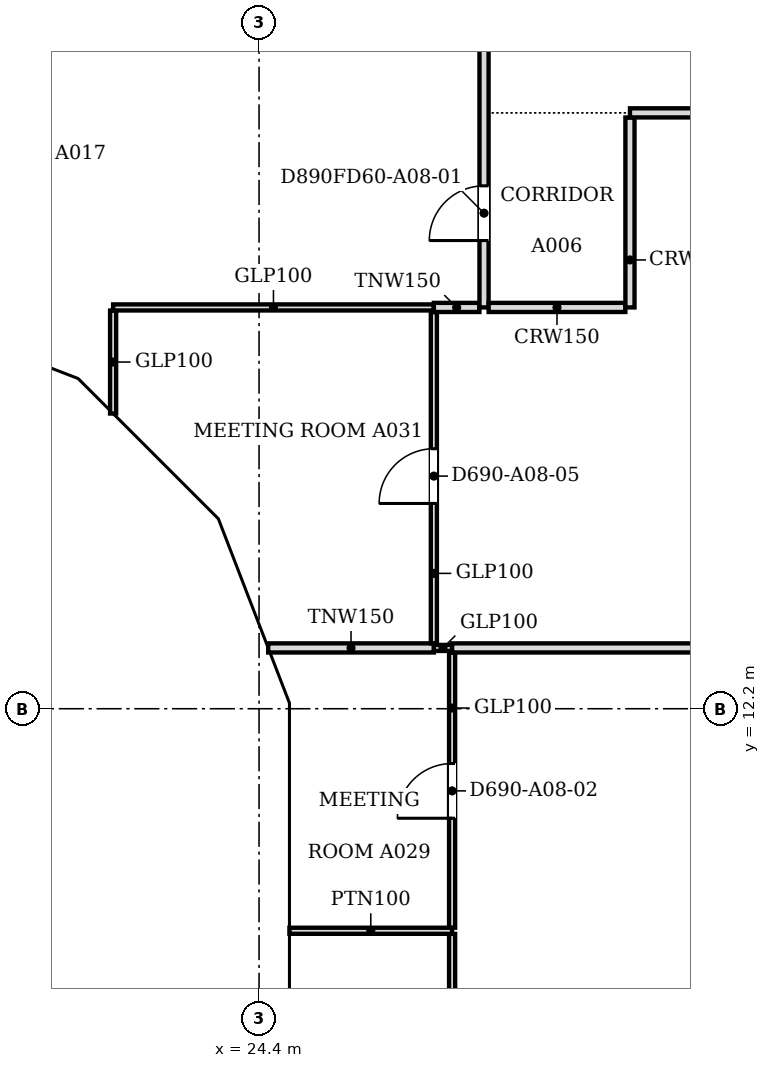
"""IFC4 building model, lengths in metres.
Left out: names, types, materials, properties, quantities, classifications, styles, units other than length and angle.
Written with IfcOpenShell. Run it as: python <this file> out.ifc"""

import sys

from ifc_helpers import new_model, si_unit, direction, frame, frame_2d, origin, place, context, subcontext, project, spatial, polyline, rectangle, outline, extrude, faceted_brep, source, transform, mapped, element, fill, save


model = new_model("IFC4")
c1 = context("Model", 3, precision=1e-05, world=origin(), true_north=direction((0.0, 1.0)))
c2 = subcontext(c1, "Body", "Model", "MODEL_VIEW")
j1 = project(units=[si_unit("LENGTHUNIT", "METRE"), si_unit("PLANEANGLEUNIT", "RADIAN")], contexts=[c1])
p1 = place(None, origin())
s1 = spatial("IfcSite", under=j1, at=p1, CompositionType="ELEMENT")
p2 = place(p1, origin())
s2 = spatial("IfcBuilding", under=s1, at=p2, CompositionType="ELEMENT")
p3 = place(p2, frame((0.0, 0.0, 91.4)))
s3 = spatial("IfcBuildingStorey", under=s2, at=p3, CompositionType="ELEMENT", Elevation=91.4)
m1 = source(origin(), c2, "Body", "Brep", [
    faceted_brep([(0.093, -0.25, 0.056), (3.143, -0.25, 3.736), (3.143, -0.25, 3.864), (0.093, -0.25, 7.544), (0.0, 0.25, 7.543), (0.047, 0.25, 7.6), (3.196, 0.25, 3.8), (0.047, 0.25, 0.0), (0.0, 0.25, 0.057), (3.196, -0.0, 3.8), (0.047, 0.0, 0.0), (0.047, 0.0, 7.6)], [[[0, 1, 2, 3]], [[4, 5, 6, 7, 8]], [[7, 6, 9, 1, 0, 10]], [[6, 5, 11, 3, 2, 9]], [[5, 4, 11]], [[8, 7, 10]], [[8, 10, 0, 3, 11, 4]], [[1, 9, 2]]]),
])
p4 = place(p3, frame((18.303, 18.567, -3.8), z_axis=(0.0, 0.0, 1.0), x_axis=(0.932978940178, -0.359930961693, 0.0)))
e1 = element("IfcWall", 1, at=p4, inside=s3, PredefinedType="SOLIDWALL", context=c2, shape_type="MappedRepresentation", body=[
    mapped(m1, transform((0.0, 0.0, 0.0), scale=1.0)),
])
m2 = source(origin(), c2, "Body", "SweptSolid", [
    extrude(outline(polyline([(0.247, 0.633), (2.871, 3.8), (0.247, 6.967), (0.247, 0.633)])), frame((0.0, 0.26, 0.0), z_axis=(0.0, -1.0, 0.0), x_axis=(1.0, 0.0, 0.0)), (0.0, 0.0, 1.0), 0.52),
])
p5 = place(p4, origin())
e2 = element("IfcOpeningElement", 2, at=p5, cuts=e1, PredefinedType="OPENING", context=c2, shape_type="MappedRepresentation", body=[
    mapped(m2, transform((0.0, 0.0, 0.0), scale=1.0)),
])
m3 = source(origin(), c2, "Body", "Brep", [
    faceted_brep([(3.103, -0.25, 7.536), (0.053, -0.25, 3.864), (0.053, -0.25, 3.736), (3.103, -0.25, 0.064), (0.0, 0.25, 3.8), (3.156, 0.25, 7.6), (3.209, 0.25, 7.536), (3.209, 0.25, 0.064), (3.156, 0.25, 0.0), (3.156, -0.0, 0.0), (3.156, -0.0, 7.6), (0.0, 0.0, 3.8)], [[[0, 1, 2, 3]], [[4, 5, 6, 7, 8]], [[8, 7, 9]], [[6, 5, 10]], [[5, 4, 11, 1, 0, 10]], [[4, 8, 9, 3, 2, 11]], [[11, 2, 1]], [[3, 9, 7, 6, 10, 0]]]),
])
p6 = place(p3, frame((21.285, 17.417, -3.8), z_axis=(0.0, 0.0, 1.0), x_axis=(0.707106781187, -0.707106781187, 0.0)))
e3 = element("IfcWall", 3, at=p6, inside=s3, PredefinedType="SOLIDWALL", context=c2, shape_type="MappedRepresentation", body=[
    mapped(m3, transform((0.0, 0.0, 0.0), scale=1.0)),
])
m4 = source(origin(), c2, "Body", "SweptSolid", [
    extrude(outline(polyline([(2.956, 6.968), (0.325, 3.8), (2.956, 0.632), (2.956, 6.968)])), frame((0.0, 0.26, 0.0), z_axis=(0.0, -1.0, 0.0), x_axis=(1.0, 0.0, 0.0)), (0.0, 0.0, 1.0), 0.52),
])
p7 = place(p6, origin())
e4 = element("IfcOpeningElement", 4, at=p7, cuts=e3, PredefinedType="OPENING", context=c2, shape_type="MappedRepresentation", body=[
    mapped(m4, transform((0.0, 0.0, 0.0), scale=1.0)),
])
m5 = source(origin(), c2, "Body", "Brep", [
    faceted_brep([(0.106, -0.25, 0.064), (3.156, -0.25, 3.744), (3.156, -0.25, 3.856), (0.106, -0.25, 7.536), (0.0, 0.25, 7.536), (0.053, 0.25, 7.6), (3.202, 0.25, 3.8), (0.053, 0.25, 0.0), (0.0, 0.25, 0.064), (3.202, -0.0, 3.8), (0.053, 0.0, 0.0), (0.053, 0.0, 7.6)], [[[0, 1, 2, 3]], [[4, 5, 6, 7, 8]], [[7, 6, 9, 1, 0, 10]], [[6, 5, 11, 3, 2, 9]], [[5, 4, 11]], [[8, 7, 10]], [[8, 10, 0, 3, 11, 4]], [[1, 9, 2]]]),
])
p8 = place(p3, frame((23.497, 15.234, -3.8), z_axis=(0.0, 0.0, 1.0), x_axis=(0.359913782069, -0.932985567668, 0.0)))
e5 = element("IfcWall", 5, at=p8, inside=s3, PredefinedType="SOLIDWALL", context=c2, shape_type="MappedRepresentation", body=[
    mapped(m5, transform((0.0, 0.0, 0.0), scale=1.0)),
])
m6 = source(origin(), c2, "Body", "SweptSolid", [
    extrude(outline(polyline([(0.253, 0.633), (2.878, 3.8), (0.253, 6.967), (0.253, 0.633)])), frame((0.0, 0.26, 0.0), z_axis=(0.0, -1.0, 0.0), x_axis=(1.0, 0.0, 0.0)), (0.0, 0.0, 1.0), 0.52),
])
p9 = place(p8, origin())
e6 = element("IfcOpeningElement", 6, at=p9, cuts=e5, PredefinedType="OPENING", context=c2, shape_type="MappedRepresentation", body=[
    mapped(m6, transform((0.0, 0.0, 0.0), scale=1.0)),
])
m7 = source(origin(), c2, "Body", "Brep", [
    faceted_brep([(3.096, -0.25, 0.0), (6.1, -0.25, 3.8), (3.096, -0.25, 7.6), (0.047, -0.25, 3.857), (0.047, -0.25, 3.743), (0.0, 0.25, 3.8), (3.096, 0.25, 7.6), (6.053, 0.25, 3.859), (6.053, 0.25, 3.741), (3.096, 0.25, 0.0), (6.1, -0.0, 3.8), (0.0, 0.0, 3.8)], [[[0, 1, 2, 3, 4]], [[5, 6, 7, 8, 9]], [[9, 8, 10, 1, 0]], [[7, 6, 2, 1, 10]], [[6, 5, 11, 3, 2]], [[5, 9, 0, 4, 11]], [[11, 4, 3]], [[10, 8, 7]]]),
])
p10 = place(p3, frame((24.65, 12.247, -3.8), z_axis=(0.0, 0.0, 1.0), x_axis=(0.0, -1.0, 0.0)))
e7 = element("IfcWall", 7, at=p10, inside=s3, PredefinedType="SOLIDWALL", context=c2, shape_type="MappedRepresentation", body=[
    mapped(m7, transform((0.0, 0.0, 0.0), scale=1.0)),
])
m8 = source(origin(), c2, "Body", "SweptSolid", [
    extrude(outline(polyline([(3.094, 0.399), (5.781, 3.8), (3.094, 7.2), (0.323, 3.8), (3.094, 0.399)])), frame((0.0, 0.26, 0.0), z_axis=(0.0, -1.0, 0.0), x_axis=(1.0, 0.0, 0.0)), (0.0, 0.0, 1.0), 0.52),
])
p11 = place(p10, origin())
e8 = element("IfcOpeningElement", 8, at=p11, cuts=e7, PredefinedType="OPENING", context=c2, shape_type="MappedRepresentation", body=[
    mapped(m8, transform((0.0, 0.0, 0.0), scale=1.0)),
])
p12 = place(p2, frame((0.0, 0.0, 95.2)))
s4 = spatial("IfcBuildingStorey", under=s2, at=p12, CompositionType="ELEMENT", Elevation=95.2)
m9 = source(origin(), c2, "Body", "Brep", [
    faceted_brep([(3.096, -0.25, 7.536), (0.047, -0.25, 3.856), (0.047, -0.25, 3.744), (3.096, -0.25, 0.064), (0.0, 0.25, 3.8), (3.149, 0.25, 7.6), (3.202, 0.25, 7.536), (3.202, 0.25, 0.064), (3.149, 0.25, 0.0), (3.149, -0.0, 0.0), (3.149, -0.0, 7.6), (0.0, 0.0, 3.8)], [[[0, 1, 2, 3]], [[4, 5, 6, 7, 8]], [[8, 7, 9]], [[6, 5, 10]], [[5, 4, 11, 1, 0, 10]], [[4, 8, 9, 3, 2, 11]], [[11, 2, 1]], [[3, 9, 7, 6, 10, 0]]]),
])
p13 = place(p12, frame((18.346, 18.55, -3.8), z_axis=(0.0, 0.0, 1.0), x_axis=(0.932985567668, -0.359913782069, 0.0)))
e9 = element("IfcWall", 9, at=p13, inside=s4, PredefinedType="SOLIDWALL", context=c2, shape_type="MappedRepresentation", body=[
    mapped(m9, transform((0.0, 0.0, 0.0), scale=1.0)),
])
m10 = source(origin(), c2, "Body", "SweptSolid", [
    extrude(outline(polyline([(2.949, 6.967), (0.325, 3.8), (2.949, 0.633), (2.949, 6.967)])), frame((0.0, 0.26, 0.0), z_axis=(0.0, -1.0, 0.0), x_axis=(1.0, 0.0, 0.0)), (0.0, 0.0, 1.0), 0.52),
])
p14 = place(p13, origin())
e10 = element("IfcOpeningElement", 10, at=p14, cuts=e9, PredefinedType="OPENING", context=c2, shape_type="MappedRepresentation", body=[
    mapped(m10, transform((0.0, 0.0, 0.0), scale=1.0)),
])
m11 = source(origin(), c2, "Body", "Brep", [
    faceted_brep([(0.106, -0.25, 0.064), (3.156, -0.25, 3.736), (3.156, -0.25, 3.864), (0.106, -0.25, 7.536), (0.0, 0.25, 7.536), (0.053, 0.25, 7.6), (3.209, 0.25, 3.8), (0.053, 0.25, 0.0), (0.0, 0.25, 0.064), (3.209, -0.0, 3.8), (0.053, 0.0, 0.0), (0.053, 0.0, 7.6)], [[[0, 1, 2, 3]], [[4, 5, 6, 7, 8]], [[7, 6, 9, 1, 0, 10]], [[6, 5, 11, 3, 2, 9]], [[5, 4, 11]], [[8, 7, 10]], [[8, 10, 0, 3, 11, 4]], [[1, 9, 2]]]),
])
p15 = place(p12, frame((21.248, 17.454, -3.8), z_axis=(0.0, 0.0, 1.0), x_axis=(0.707106781187, -0.707106781187, 0.0)))
e11 = element("IfcWall", 11, at=p15, inside=s4, PredefinedType="SOLIDWALL", context=c2, shape_type="MappedRepresentation", body=[
    mapped(m11, transform((0.0, 0.0, 0.0), scale=1.0)),
])
m12 = source(origin(), c2, "Body", "SweptSolid", [
    extrude(outline(polyline([(0.253, 0.632), (2.884, 3.8), (0.253, 6.968), (0.253, 0.632)])), frame((0.0, 0.26, 0.0), z_axis=(0.0, -1.0, 0.0), x_axis=(1.0, 0.0, 0.0)), (0.0, 0.0, 1.0), 0.52),
])
p16 = place(p15, origin())
e12 = element("IfcOpeningElement", 12, at=p16, cuts=e11, PredefinedType="OPENING", context=c2, shape_type="MappedRepresentation", body=[
    mapped(m12, transform((0.0, 0.0, 0.0), scale=1.0)),
])
m13 = source(origin(), c2, "Body", "Brep", [
    faceted_brep([(3.103, -0.25, 7.544), (0.053, -0.25, 3.864), (0.053, -0.25, 3.736), (3.103, -0.25, 0.056), (0.0, 0.25, 3.8), (3.149, 0.25, 7.6), (3.196, 0.25, 7.543), (3.196, 0.25, 0.057), (3.149, 0.25, 0.0), (3.149, -0.0, 0.0), (3.149, -0.0, 7.6), (0.0, 0.0, 3.8)], [[[0, 1, 2, 3]], [[4, 5, 6, 7, 8]], [[8, 7, 9]], [[6, 5, 10]], [[5, 4, 11, 1, 0, 10]], [[4, 8, 9, 3, 2, 11]], [[11, 2, 1]], [[3, 9, 7, 6, 10, 0]]]),
])
p17 = place(p12, frame((23.517, 15.185, -3.8), z_axis=(0.0, 0.0, 1.0), x_axis=(0.359864468756, -0.933004589553, 0.0)))
e13 = element("IfcWall", 13, at=p17, inside=s4, PredefinedType="SOLIDWALL", context=c2, shape_type="MappedRepresentation", body=[
    mapped(m13, transform((0.0, 0.0, 0.0), scale=1.0)),
])
p18 = place(p17, origin())
e14 = element("IfcOpeningElement", 14, at=p18, cuts=e13, PredefinedType="OPENING", context=c2, shape_type="MappedRepresentation", body=[
    mapped(m10, transform((0.0, 0.0, 0.0), scale=1.0)),
])
m14 = source(origin(), c2, "Body", "Brep", [
    faceted_brep([(0.093, -0.25, 0.057), (3.143, -0.25, 3.8), (0.093, -0.25, 7.543), (0.0, 0.25, 7.544), (0.047, 0.25, 7.6), (3.143, 0.25, 3.8), (0.047, 0.25, 0.0), (0.0, 0.25, 0.056), (0.047, 0.0, 0.0), (0.047, 0.0, 7.6)], [[[0, 1, 2]], [[3, 4, 5, 6, 7]], [[6, 5, 1, 0, 8]], [[5, 4, 9, 2, 1]], [[4, 3, 9]], [[7, 6, 8]], [[7, 8, 0, 2, 9, 3]]]),
])
p19 = place(p12, frame((24.65, 12.293, -3.8), z_axis=(0.0, 0.0, 1.0), x_axis=(0.0, -1.0, 0.0)))
e15 = element("IfcWall", 15, at=p19, inside=s4, PredefinedType="SOLIDWALL", context=c2, shape_type="MappedRepresentation", body=[
    mapped(m14, transform((0.0, 0.0, 0.0), scale=1.0)),
])
m15 = source(origin(), c2, "Body", "SweptSolid", [
    extrude(outline(polyline([(0.247, 0.641), (2.821, 3.8), (0.247, 6.959), (0.247, 0.641)])), frame((0.0, 0.26, 0.0), z_axis=(0.0, -1.0, 0.0), x_axis=(1.0, 0.0, 0.0)), (0.0, 0.0, 1.0), 0.52),
])
p20 = place(p19, origin())
e16 = element("IfcOpeningElement", 16, at=p20, cuts=e15, PredefinedType="OPENING", context=c2, shape_type="MappedRepresentation", body=[
    mapped(m15, transform((0.0, 0.0, 0.0), scale=1.0)),
])
m16 = source(origin(), c2, "Body", "Brep", [
    faceted_brep([(3.003, -0.25, 0.0), (3.05, -0.25, 0.06), (3.05, -0.25, 7.54), (3.003, -0.25, 7.6), (0.0, -0.25, 3.8), (0.0, 0.25, 3.8), (2.957, 0.25, 7.541), (2.957, 0.25, 0.059), (3.003, 0.0, 0.0), (3.003, 0.0, 7.6)], [[[0, 1, 2, 3, 4]], [[5, 6, 7]], [[1, 0, 8]], [[9, 3, 2]], [[6, 5, 4, 3, 9]], [[5, 7, 8, 0, 4]], [[1, 8, 7, 6, 9, 2]]]),
])
p21 = place(p12, frame((24.65, 9.15, -3.8), z_axis=(0.0, 0.0, 1.0), x_axis=(0.0, -1.0, 0.0)))
e17 = element("IfcWall", 17, at=p21, inside=s4, PredefinedType="SOLIDWALL", context=c2, shape_type="MappedRepresentation", body=[
    mapped(m16, transform((0.0, 0.0, 0.0), scale=1.0)),
])
m17 = source(origin(), c2, "Body", "SweptSolid", [
    extrude(outline(polyline([(2.803, 6.944), (0.319, 3.8), (2.803, 0.656), (2.803, 6.944)])), frame((0.0, 0.26, 0.0), z_axis=(0.0, -1.0, 0.0), x_axis=(1.0, 0.0, 0.0)), (0.0, 0.0, 1.0), 0.52),
])
p22 = place(p21, origin())
e18 = element("IfcOpeningElement", 18, at=p22, cuts=e17, PredefinedType="OPENING", context=c2, shape_type="MappedRepresentation", body=[
    mapped(m17, transform((0.0, 0.0, 0.0), scale=1.0)),
])
p23 = place(p3, frame((27.575, 4.2, 0.0), z_axis=(0.0, 0.0, 1.0), x_axis=(0.0, 1.0, 0.0)))
e19 = element("IfcWall", 19, at=p23, inside=s3, PredefinedType="PARTITIONING", context=c2, shape_type="SweptSolid", body=[
    extrude(rectangle(XDim=4.297, YDim=0.1, at=frame_2d((2.148, 0.0))), origin(), (0.0, 0.0, 1.0), 2.895),
])
m18 = source(origin(), c2, "Body", "SweptSolid", [
    extrude(rectangle(XDim=0.9, YDim=2.1, at=frame_2d((0.45, 1.05))), frame((0.0, 0.06, 0.0), z_axis=(0.0, -1.0, 0.0), x_axis=(1.0, 0.0, 0.0)), (0.0, 0.0, 1.0), 0.12),
])
p24 = place(p23, frame((1.7, 0.0, 0.0)))
e20 = element("IfcOpeningElement", 20, at=p24, cuts=e19, PredefinedType="OPENING", context=c2, shape_type="MappedRepresentation", body=[
    mapped(m18, transform((0.0, 0.0, 0.0), scale=1.0)),
])
p25 = place(p3, frame((24.9, 8.548, 0.0), z_axis=(0.0, 0.0, 1.0), x_axis=(1.0, 0.0, 0.0)))
e21 = element("IfcWall", 21, at=p25, inside=s3, PredefinedType="PARTITIONING", context=c2, shape_type="SweptSolid", body=[
    extrude(rectangle(XDim=2.675, YDim=0.1, at=frame_2d((1.337, 0.0))), origin(), (0.0, 0.0, 1.0), 2.895),
])
p26 = place(p3, frame((27.575, 8.599, 0.0), z_axis=(0.0, 0.0, 1.0), x_axis=(0.0, 1.0, 0.0)))
e22 = element("IfcWall", 22, at=p26, inside=s3, PredefinedType="PARTITIONING", context=c2, shape_type="SweptSolid", body=[
    extrude(rectangle(XDim=4.525, YDim=0.1, at=frame_2d((2.263, 0.0))), origin(), (0.0, 0.0, 1.0), 2.895),
])
p27 = place(p26, frame((1.8, 0.0, 0.0)))
e23 = element("IfcOpeningElement", 23, at=p27, cuts=e22, PredefinedType="OPENING", context=c2, shape_type="MappedRepresentation", body=[
    mapped(m18, transform((0.0, 0.0, 0.0), scale=1.0)),
])
p28 = place(p3, frame((24.55, 13.2, 0.0), z_axis=(0.0, 0.0, 1.0), x_axis=(1.0, 0.0, 0.0)))
e24 = element("IfcWall", 24, at=p28, inside=s3, PredefinedType="PARTITIONING", context=c2, shape_type="SweptSolid", body=[
    extrude(rectangle(XDim=2.725, YDim=0.15, at=frame_2d((1.362, 0.0))), origin(), (0.0, 0.0, 1.0), 2.895),
])
p29 = place(p3, frame((27.276, 13.2, 0.0), z_axis=(0.0, 0.0, 1.0), x_axis=(1.0, 0.0, 0.0)))
e25 = element("IfcWall", 25, at=p29, inside=s3, PredefinedType="PARTITIONING", context=c2, shape_type="SweptSolid", body=[
    extrude(rectangle(XDim=0.298, YDim=0.1, at=frame_2d((0.149, 0.0))), origin(), (0.0, 0.0, 1.0), 2.895),
])
p30 = place(p3, frame((27.575, 13.2, 0.0), z_axis=(0.0, 0.0, 1.0), x_axis=(1.0, 0.0, 0.0)))
e26 = element("IfcWall", 26, at=p30, inside=s3, PredefinedType="PARTITIONING", context=c2, shape_type="SweptSolid", body=[
    extrude(rectangle(XDim=15.349, YDim=0.15, at=frame_2d((7.675, 0.0))), origin(), (0.0, 0.0, 1.0), 2.895),
])
p31 = place(p3, frame((27.275, 13.276, 0.0), z_axis=(0.0, 0.0, 1.0), x_axis=(0.0, 1.0, 0.0)))
e27 = element("IfcWall", 27, at=p31, inside=s3, PredefinedType="PARTITIONING", context=c2, shape_type="SweptSolid", body=[
    extrude(rectangle(XDim=5.448, YDim=0.1, at=frame_2d((2.724, 0.0))), origin(), (0.0, 0.0, 1.0), 2.895),
])
p32 = place(p31, frame((2.3, 0.0, 0.0)))
e28 = element("IfcOpeningElement", 28, at=p32, cuts=e27, PredefinedType="OPENING", context=c2, shape_type="MappedRepresentation", body=[
    mapped(m18, transform((0.0, 0.0, 0.0), scale=1.0)),
])
p33 = place(p3, frame((22.0, 17.055, 0.0), z_axis=(0.0, 0.0, 1.0), x_axis=(0.0, 1.0, 0.0)))
e29 = element("IfcWall", 29, at=p33, inside=s3, PredefinedType="PARTITIONING", context=c2, shape_type="SweptSolid", body=[
    extrude(rectangle(XDim=1.694, YDim=0.1, at=frame_2d((0.847, 0.0))), origin(), (0.0, 0.0, 1.0), 2.895),
])
p34 = place(p3, frame((22.0, 18.8, 0.0), z_axis=(0.0, 0.0, 1.0), x_axis=(1.0, 0.0, 0.0)))
e30 = element("IfcWall", 30, at=p34, inside=s3, PredefinedType="PARTITIONING", context=c2, shape_type="SweptSolid", body=[
    extrude(rectangle(XDim=5.274, YDim=0.1, at=frame_2d((2.637, 0.0))), origin(), (0.0, 0.0, 1.0), 2.895),
])
p35 = place(p3, frame((27.275, 18.8, 0.0), z_axis=(0.0, 0.0, 1.0), x_axis=(1.0, 0.0, 0.0)))
e31 = element("IfcWall", 31, at=p35, inside=s3, PredefinedType="PARTITIONING", context=c2, shape_type="SweptSolid", body=[
    extrude(rectangle(XDim=0.749, YDim=0.15, at=frame_2d((0.375, 0.0))), origin(), (0.0, 0.0, 1.0), 2.895),
])
p36 = place(p3, frame((28.1, 18.8, 0.0), z_axis=(0.0, 0.0, 1.0), x_axis=(0.0, 1.0, 0.0)))
e32 = element("IfcWall", 32, at=p36, inside=s3, PredefinedType="PARTITIONING", context=c2, shape_type="SweptSolid", body=[
    extrude(rectangle(XDim=26.424, YDim=0.15, at=frame_2d((13.212, 0.0))), origin(), (0.0, 0.0, 1.0), 2.895),
])
m19 = source(origin(), c2, "Body", "SweptSolid", [
    extrude(rectangle(XDim=0.9, YDim=2.1, at=frame_2d((0.45, 1.05))), frame((0.0, 0.085, 0.0), z_axis=(0.0, -1.0, 0.0), x_axis=(1.0, 0.0, 0.0)), (0.0, 0.0, 1.0), 0.17),
])
p37 = place(p36, frame((1.1, 0.0, 0.0)))
e33 = element("IfcOpeningElement", 33, at=p37, cuts=e32, PredefinedType="OPENING", context=c2, shape_type="MappedRepresentation", body=[
    mapped(m19, transform((0.0, 0.0, 0.0), scale=1.0)),
])
p38 = place(p36, frame((23.151, 0.0, 0.0)))
e34 = element("IfcOpeningElement", 34, at=p38, cuts=e32, PredefinedType="OPENING", context=c2, shape_type="MappedRepresentation", body=[
    mapped(m19, transform((0.0, 0.0, 0.0), scale=1.0)),
])
m20 = source(origin(), c2, "Body", "SweptSolid", [
    extrude(rectangle(XDim=1.0, YDim=2.1, at=frame_2d((0.5, 1.05))), frame((0.0, 0.085, 0.0), z_axis=(0.0, -1.0, 0.0), x_axis=(1.0, 0.0, 0.0)), (0.0, 0.0, 1.0), 0.17),
])
p39 = place(p36, frame((17.251, 0.0, 0.0)))
e35 = element("IfcOpeningElement", 35, at=p39, cuts=e32, PredefinedType="OPENING", context=c2, shape_type="MappedRepresentation", body=[
    mapped(m20, transform((0.0, 0.0, 0.0), scale=1.0)),
])
p40 = place(p36, frame((9.7, 0.0, 0.0)))
e36 = element("IfcOpeningElement", 36, at=p40, cuts=e32, PredefinedType="OPENING", context=c2, shape_type="MappedRepresentation", body=[
    mapped(m19, transform((0.0, 0.0, 0.0), scale=1.0)),
])
p41 = place(p3, frame((28.176, 18.8, 0.0), z_axis=(0.0, 0.0, 1.0), x_axis=(1.0, 0.0, 0.0)))
e37 = element("IfcWall", 37, at=p41, inside=s3, PredefinedType="PARTITIONING", context=c2, shape_type="SweptSolid", body=[
    extrude(rectangle(XDim=2.248, YDim=0.15, at=frame_2d((1.124, 0.0))), origin(), (0.0, 0.0, 1.0), 2.895),
])
p42 = place(p3, frame((30.5, 18.8, 0.0), z_axis=(0.0, 0.0, 1.0), x_axis=(0.0, 1.0, 0.0)))
e38 = element("IfcWall", 38, at=p42, inside=s3, PredefinedType="PARTITIONING", context=c2, shape_type="SweptSolid", body=[
    extrude(rectangle(XDim=3.124, YDim=0.15, at=frame_2d((1.562, 0.0))), origin(), (0.0, 0.0, 1.0), 2.895),
])
p43 = place(p3, frame((30.5, 22.0, 0.0), z_axis=(0.0, 0.0, 1.0), x_axis=(1.0, 0.0, 0.0)))
e39 = element("IfcWall", 39, at=p43, inside=s3, PredefinedType="PARTITIONING", context=c2, shape_type="SweptSolid", body=[
    extrude(rectangle(XDim=12.5, YDim=0.15, at=frame_2d((6.25, 0.0))), origin(), (0.0, 0.0, 1.0), 2.895),
])
m21 = source(origin(), c2, "Body", "SweptSolid", [
    extrude(rectangle(XDim=0.9, YDim=2.1, at=frame_2d((0.45, 1.05))), frame((0.0, 0.025, 0.0), z_axis=(0.0, -1.0, 0.0), x_axis=(1.0, 0.0, 0.0)), (0.0, 0.0, 1.0), 0.05),
])
p44 = place(p37, origin())
e40 = element("IfcDoor", 40, at=p44, inside=s3, OperationType="SINGLE_SWING_LEFT", PredefinedType="DOOR", context=c2, shape_type="MappedRepresentation", body=[
    mapped(m21, transform((0.0, 0.0, 0.0), scale=1.0)),
])
fill(e33, e40)
p45 = place(p27, origin())
e41 = element("IfcDoor", 41, at=p45, inside=s3, OperationType="SINGLE_SWING_LEFT", PredefinedType="DOOR", context=c2, shape_type="MappedRepresentation", body=[
    mapped(m21, transform((0.0, 0.0, 0.0), scale=1.0)),
])
fill(e23, e41)
p46 = place(p32, origin())
e42 = element("IfcDoor", 42, at=p46, inside=s3, OperationType="SINGLE_SWING_LEFT", PredefinedType="DOOR", context=c2, shape_type="MappedRepresentation", body=[
    mapped(m21, transform((0.0, 0.0, 0.0), scale=1.0)),
])
fill(e28, e42)
save(model, sys.argv[1])
